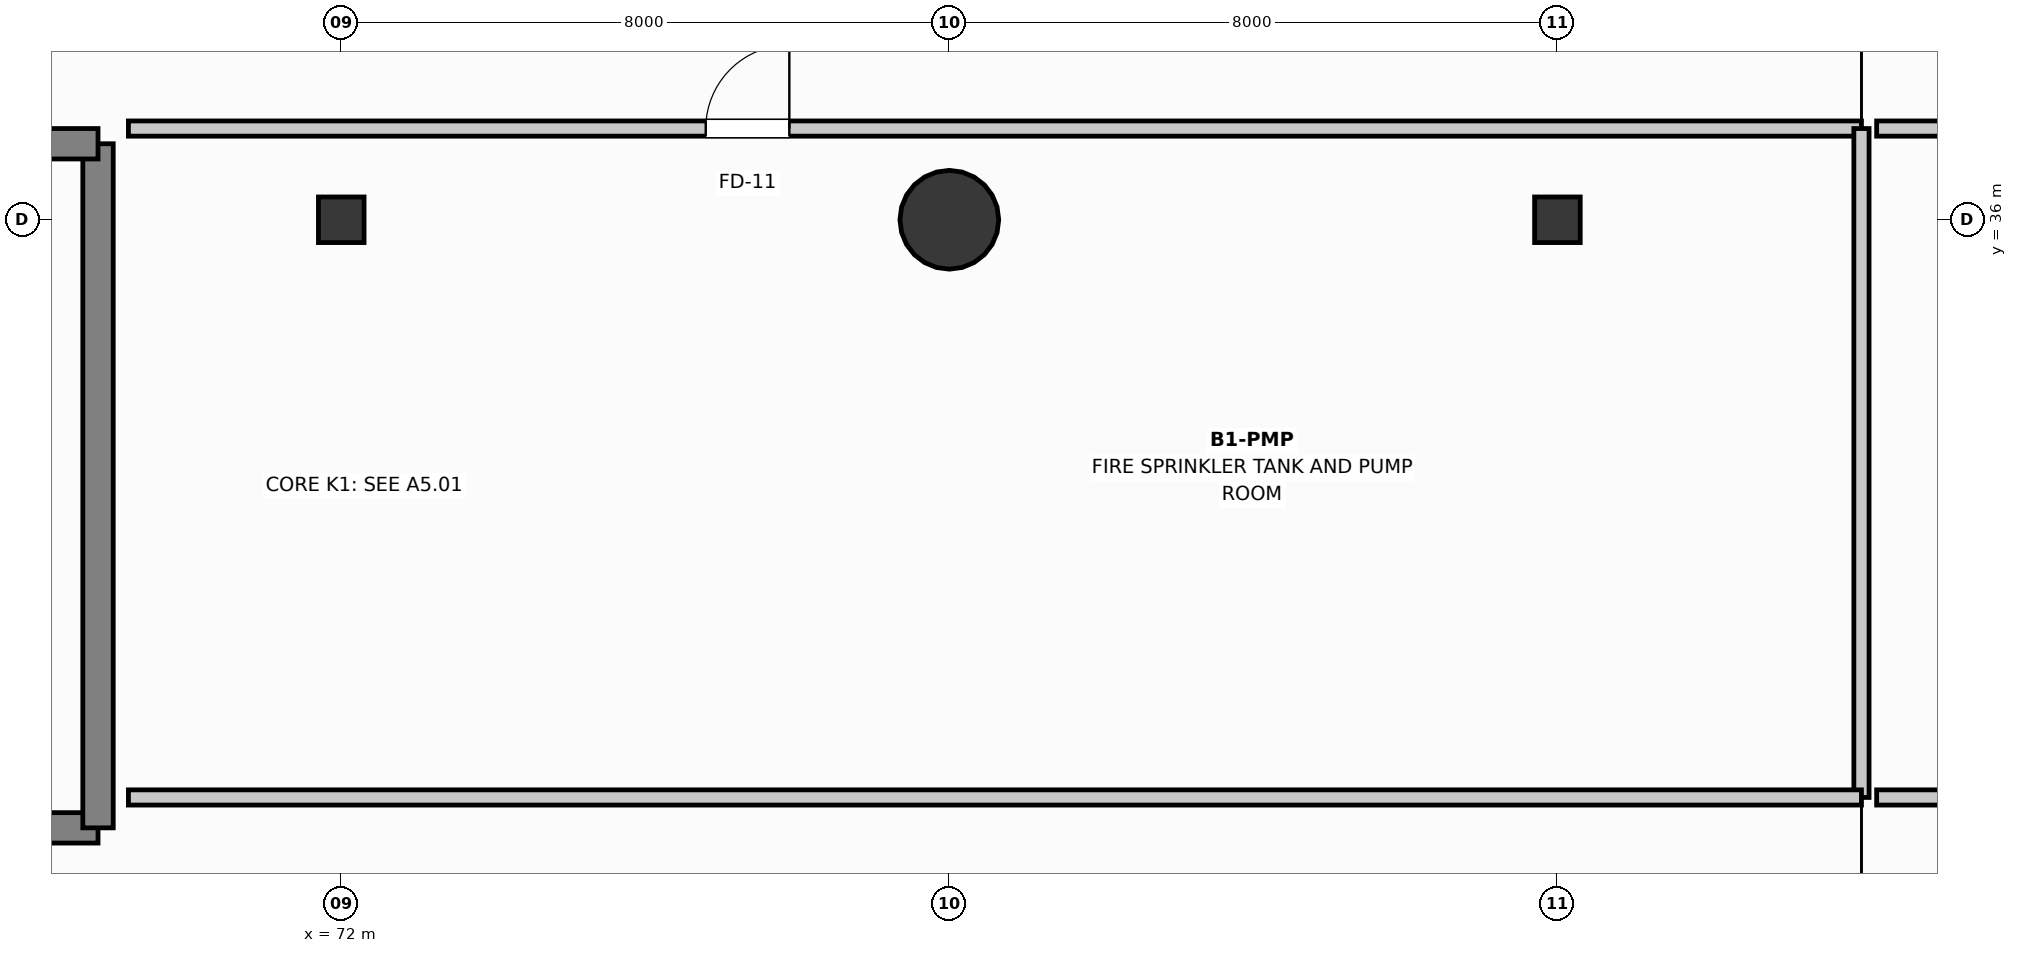
"""IFC4 building model, lengths in metres.
Left out: names, types, materials, properties, quantities, classifications, styles, units other than length and angle.
Written with IfcOpenShell. Run it as: python <this file> out.ifc"""

import sys

from ifc_helpers import new_model, si_unit, direction, frame, frame_2d, origin, origin_2d, place, context, subcontext, project, spatial, rectangle, circle, extrude, element, fill, save


model = new_model("IFC4")
c1 = context("Model", 3, precision=1e-05, world=origin(), true_north=direction((0.0, 1.0)))
c2 = subcontext(c1, "Body", "Model", "MODEL_VIEW")
j1 = project(units=[si_unit("LENGTHUNIT", "METRE"), si_unit("PLANEANGLEUNIT", "RADIAN")], contexts=[c1])
p1 = place(None, origin())
s1 = spatial("IfcSite", under=j1, at=p1, CompositionType="ELEMENT")
p2 = place(p1, origin())
s2 = spatial("IfcBuilding", under=s1, at=p2, CompositionType="ELEMENT")
p3 = place(p2, frame((0.0, 0.0, -5.4)))
s3 = spatial("IfcBuildingStorey", under=s2, at=p3, CompositionType="ELEMENT", Elevation=-5.4)
p4 = place(p3, frame((72.0, 36.0, 0.0), z_axis=(0.0, 0.0, 1.0), x_axis=(1.0, 0.0, 0.0)))
e1 = element("IfcColumn", 1, at=p4, inside=s3, PredefinedType="COLUMN", context=c2, shape_type="SweptSolid", body=[
    extrude(rectangle(XDim=0.6, YDim=0.6, at=origin_2d()), origin(), (0.0, 0.0, 1.0), 5.4),
])
p5 = place(p3, frame((80.0, 36.0, 0.0), z_axis=(0.0, 0.0, 1.0), x_axis=(1.0, 0.0, 0.0)))
e2 = element("IfcColumn", 2, at=p5, inside=s3, PredefinedType="COLUMN", context=c2, shape_type="SweptSolid", body=[
    extrude(circle(Radius=0.65, at=origin_2d()), origin(), (0.0, 0.0, 1.0), 5.4),
])
p6 = place(p3, frame((88.0, 36.0, 0.0), z_axis=(0.0, 0.0, 1.0), x_axis=(1.0, 0.0, 0.0)))
e3 = element("IfcColumn", 3, at=p6, inside=s3, PredefinedType="COLUMN", context=c2, shape_type="SweptSolid", body=[
    extrude(rectangle(XDim=0.6, YDim=0.6, at=origin_2d()), origin(), (0.0, 0.0, 1.0), 5.4),
])
p7 = place(p3, frame((51.4, 28.0, 0.0), z_axis=(0.0, 0.0, 1.0), x_axis=(1.0, 0.0, 0.0)))
e4 = element("IfcWall", 4, at=p7, inside=s3, PredefinedType="SHEAR", context=c2, shape_type="SweptSolid", body=[
    extrude(rectangle(XDim=17.4, YDim=0.4, at=frame_2d((8.7, 0.0))), origin(), (0.0, 0.0, 1.0), 5.02),
])
p8 = place(p3, frame((68.8, 28.0, 0.0), z_axis=(0.0, 0.0, 1.0), x_axis=(0.0, 1.0, 0.0)))
e5 = element("IfcWall", 5, at=p8, inside=s3, PredefinedType="SHEAR", context=c2, shape_type="SweptSolid", body=[
    extrude(rectangle(XDim=9.0, YDim=0.4, at=frame_2d((4.5, 0.0))), origin(), (0.0, 0.0, 1.0), 5.02),
])
p9 = place(p3, frame((68.8, 37.0, 0.0), z_axis=(0.0, 0.0, 1.0), x_axis=(-1.0, 0.0, 0.0)))
e6 = element("IfcWall", 6, at=p9, inside=s3, PredefinedType="SHEAR", context=c2, shape_type="SweptSolid", body=[
    extrude(rectangle(XDim=17.4, YDim=0.4, at=frame_2d((8.7, 0.0))), origin(), (0.0, 0.0, 1.0), 5.02),
])
p10 = place(p9, frame((7.6, 0.0, 0.0)))
e7 = element("IfcOpeningElement", 7, at=p10, cuts=e6, PredefinedType="OPENING", context=c2, shape_type="SweptSolid", body=[
    extrude(rectangle(XDim=2.2, YDim=2.3, at=frame_2d((1.1, 1.15))), frame((0.0, 0.21, 0.0), z_axis=(0.0, -1.0, 0.0), x_axis=(1.0, 0.0, 0.0)), (0.0, 0.0, 1.0), 0.42),
])
p11 = place(p3, frame((69.2, 37.2, 0.0), z_axis=(0.0, 0.0, 1.0), x_axis=(1.0, 0.0, 0.0)))
e8 = element("IfcWall", 8, at=p11, inside=s3, PredefinedType="PARTITIONING", context=c2, shape_type="SweptSolid", body=[
    extrude(rectangle(XDim=22.8, YDim=0.2, at=frame_2d((11.4, 0.0))), origin(), (0.0, 0.0, 1.0), 4.215),
])
p12 = place(p11, frame((7.595, 0.0, 0.0)))
e9 = element("IfcOpeningElement", 9, at=p12, cuts=e8, PredefinedType="OPENING", context=c2, shape_type="SweptSolid", body=[
    extrude(rectangle(XDim=1.1, YDim=2.2, at=frame_2d((0.55, 1.1))), frame((0.0, 0.11, 0.0), z_axis=(0.0, -1.0, 0.0), x_axis=(1.0, 0.0, 0.0)), (0.0, 0.0, 1.0), 0.22),
])
p13 = place(p3, frame((92.0, 37.2, 0.0), z_axis=(0.0, 0.0, 1.0), x_axis=(0.0, -1.0, 0.0)))
e10 = element("IfcWall", 10, at=p13, inside=s3, PredefinedType="PARTITIONING", context=c2, shape_type="SweptSolid", body=[
    extrude(rectangle(XDim=8.8, YDim=0.2, at=frame_2d((4.4, 0.0))), origin(), (0.0, 0.0, 1.0), 4.215),
])
p14 = place(p3, frame((92.0, 28.4, 0.0), z_axis=(0.0, 0.0, 1.0), x_axis=(-1.0, 0.0, 0.0)))
e11 = element("IfcWall", 11, at=p14, inside=s3, PredefinedType="PARTITIONING", context=c2, shape_type="SweptSolid", body=[
    extrude(rectangle(XDim=22.8, YDim=0.2, at=frame_2d((11.4, 0.0))), origin(), (0.0, 0.0, 1.0), 4.465),
])
p15 = place(p3, frame((92.2, 37.2, 0.0), z_axis=(0.0, 0.0, 1.0), x_axis=(1.0, 0.0, 0.0)))
e12 = element("IfcWall", 12, at=p15, inside=s3, PredefinedType="PARTITIONING", context=c2, shape_type="SweptSolid", body=[
    extrude(rectangle(XDim=22.6, YDim=0.2, at=frame_2d((11.3, 0.0))), origin(), (0.0, 0.0, 1.0), 4.625),
])
p16 = place(p15, frame((7.525, 0.0, 0.0)))
e13 = element("IfcOpeningElement", 13, at=p16, cuts=e12, PredefinedType="OPENING", context=c2, shape_type="SweptSolid", body=[
    extrude(rectangle(XDim=1.1, YDim=2.2, at=frame_2d((0.55, 1.1))), frame((0.0, 0.11, 0.0), z_axis=(0.0, -1.0, 0.0), x_axis=(1.0, 0.0, 0.0)), (0.0, 0.0, 1.0), 0.22),
])
p17 = place(p3, frame((114.8, 28.4, 0.0), z_axis=(0.0, 0.0, 1.0), x_axis=(-1.0, 0.0, 0.0)))
e14 = element("IfcWall", 14, at=p17, inside=s3, PredefinedType="PARTITIONING", context=c2, shape_type="SweptSolid", body=[
    extrude(rectangle(XDim=22.6, YDim=0.2, at=frame_2d((11.3, 0.0))), origin(), (0.0, 0.0, 1.0), 4.025),
])
p18 = place(p12, origin())
e15 = element("IfcDoor", 15, at=p18, inside=s3, OperationType="SINGLE_SWING_RIGHT", PredefinedType="DOOR", context=c2, shape_type="SweptSolid", body=[
    extrude(rectangle(XDim=1.1, YDim=2.2, at=frame_2d((0.55, 1.1))), frame((0.0, 0.025, 0.0), z_axis=(0.0, -1.0, 0.0), x_axis=(1.0, 0.0, 0.0)), (0.0, 0.0, 1.0), 0.05),
])
fill(e9, e15)
save(model, sys.argv[1])
